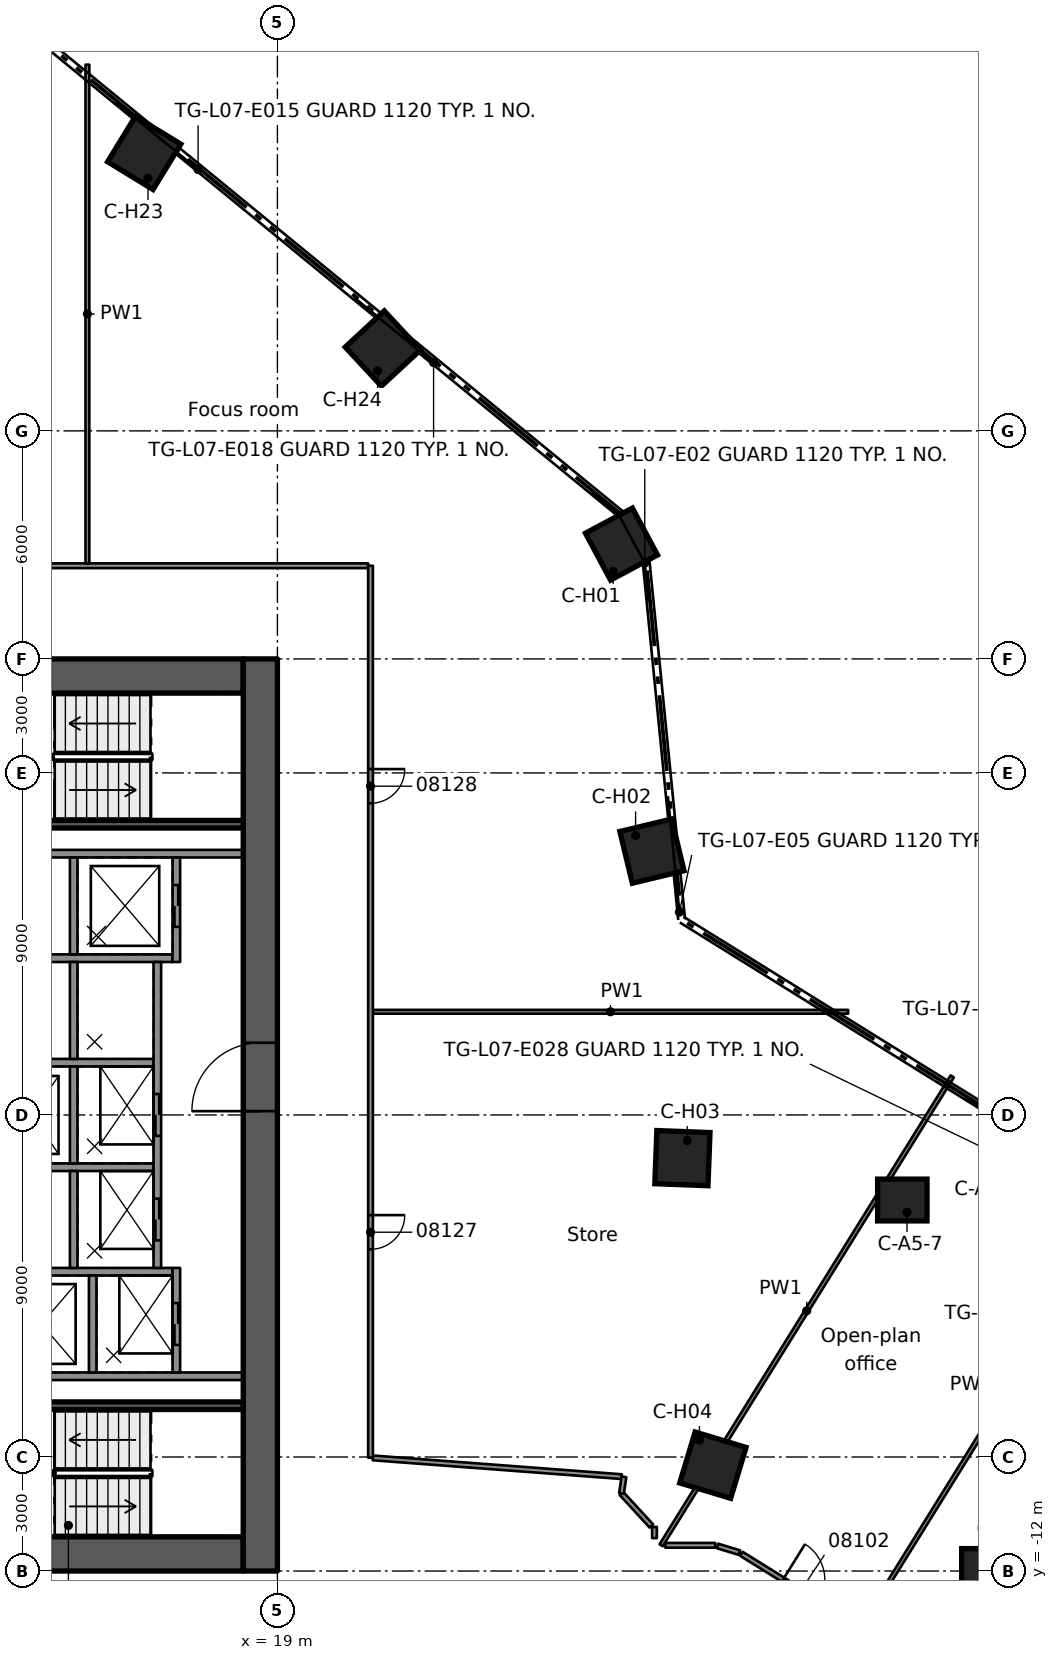
"""IFC4 building model, lengths in metres.
Left out: names, types, materials, properties, quantities, classifications, styles, units other than length and angle.
Written with IfcOpenShell. Run it as: python <this file> out.ifc"""

import sys

from ifc_helpers import new_model, si_unit, direction, frame, frame_2d, origin, origin_2d, place, context, subcontext, project, spatial, rectangle, extrude, element, fill, save


model = new_model("IFC4")
c1 = context("Model", 3, precision=1e-05, world=origin(), true_north=direction((0.0, 1.0)))
c2 = subcontext(c1, "Body", "Model", "MODEL_VIEW")
j1 = project(units=[si_unit("LENGTHUNIT", "METRE"), si_unit("PLANEANGLEUNIT", "RADIAN")], contexts=[c1])
p1 = place(None, origin())
s1 = spatial("IfcSite", under=j1, at=p1, CompositionType="ELEMENT")
p2 = place(p1, origin())
s2 = spatial("IfcBuilding", under=s1, at=p2, CompositionType="ELEMENT")
p3 = place(p2, frame((0.0, 0.0, 37.3)))
s3 = spatial("IfcBuildingStorey", under=s2, at=p3, CompositionType="ELEMENT", Elevation=37.3)
p4 = place(p3, frame((8.9, 11.55, 0.0), z_axis=(0.0, 0.0, 1.0), x_axis=(1.0, 0.0, 0.0)))
e1 = element("IfcWall", 1, at=p4, inside=s3, PredefinedType="SHEAR", context=c2, shape_type="SweptSolid", body=[
    extrude(rectangle(XDim=9.2, YDim=0.9, at=frame_2d((4.6, 0.0))), origin(), (0.0, 0.0, 1.0), 3.5),
])
p5 = place(p4, frame((3.0, 0.0, 0.0)))
e2 = element("IfcOpeningElement", 2, at=p5, cuts=e1, PredefinedType="OPENING", context=c2, shape_type="SweptSolid", body=[
    extrude(rectangle(XDim=1.1, YDim=2.1, at=frame_2d((0.55, 1.05))), frame((0.0, 0.46, 0.0), z_axis=(0.0, -1.0, 0.0), x_axis=(1.0, 0.0, 0.0)), (0.0, 0.0, 1.0), 0.92),
])
p6 = place(p3, frame((8.9, -11.55, 0.0), z_axis=(0.0, 0.0, 1.0), x_axis=(1.0, 0.0, 0.0)))
e3 = element("IfcWall", 3, at=p6, inside=s3, PredefinedType="SHEAR", context=c2, shape_type="SweptSolid", body=[
    extrude(rectangle(XDim=9.2, YDim=0.9, at=frame_2d((4.6, 0.0))), origin(), (0.0, 0.0, 1.0), 3.5),
])
p7 = place(p6, frame((3.0, 0.0, 0.0)))
e4 = element("IfcOpeningElement", 4, at=p7, cuts=e3, PredefinedType="OPENING", context=c2, shape_type="SweptSolid", body=[
    extrude(rectangle(XDim=1.1, YDim=2.1, at=frame_2d((0.55, 1.05))), frame((0.0, 0.46, 0.0), z_axis=(0.0, -1.0, 0.0), x_axis=(1.0, 0.0, 0.0)), (0.0, 0.0, 1.0), 0.92),
])
p8 = place(p3, frame((18.55, -12.0, 0.0), z_axis=(0.0, 0.0, 1.0), x_axis=(0.0, 1.0, 0.0)))
e5 = element("IfcWall", 5, at=p8, inside=s3, PredefinedType="SHEAR", context=c2, shape_type="SweptSolid", body=[
    extrude(rectangle(XDim=24.0, YDim=0.9, at=frame_2d((12.0, 0.0))), origin(), (0.0, 0.0, 1.0), 3.5),
])
p9 = place(p8, frame((12.1, 0.0, 0.0)))
e6 = element("IfcOpeningElement", 6, at=p9, cuts=e5, PredefinedType="OPENING", context=c2, shape_type="SweptSolid", body=[
    extrude(rectangle(XDim=1.8, YDim=2.1, at=frame_2d((0.9, 1.05))), frame((0.0, 0.46, 0.0), z_axis=(0.0, -1.0, 0.0), x_axis=(1.0, 0.0, 0.0)), (0.0, 0.0, 1.0), 0.92),
])
for number, where, z_axis, x_axis in (
    (7, (37.655, -11.96, 0.0), (0.0, 0.0, 1.0), (1.0, 0.0, 0.0)),
    (8, (35.444, -2.238, 0.0), (0.0, 0.0, 1.0), (1.0, 0.0, 0.0)),
):
    element("IfcColumn", number, at=place(p3, frame(where, z_axis=z_axis, x_axis=x_axis)), inside=s3, PredefinedType="COLUMN", context=c2, shape_type="SweptSolid", body=[
        extrude(rectangle(XDim=1.3, YDim=1.1, at=origin_2d()), origin(), (0.0, 0.0, 1.0), 3.5),
    ])
for number, where, z_axis, x_axis in (
    (9, (28.054, 15.021, 0.0), (0.0, 0.0, 1.0), (0.882, 0.472, 0.0)),
    (10, (28.856, 6.942, 0.0), (0.0, 0.0, 1.0), (0.972, 0.234, 0.0)),
    (11, (29.657, -1.136, 0.0), (0.0, 0.0, 1.0), (0.999, -0.038, 0.0)),
    (12, (30.459, -9.215, 0.0), (0.0, 0.0, 1.0), (0.957, -0.29, 0.0)),
    (13, (15.495, 25.313, 0.0), (0.0, 0.0, 1.0), (0.522, 0.853, 0.0)),
    (14, (21.774, 20.167, 0.0), (0.0, 0.0, 1.0), (0.734, 0.68, 0.0)),
):
    element("IfcColumn", number, at=place(p3, frame(where, z_axis=z_axis, x_axis=x_axis)), inside=s3, PredefinedType="COLUMN", context=c2, shape_type="SweptSolid", body=[
        extrude(rectangle(XDim=1.4, YDim=1.4, at=origin_2d()), origin(), (0.0, 0.0, 1.0), 3.5),
    ])
for number, where, z_axis, x_axis in (
    (15, (11.54, -6.875, 0.0), (0.0, 0.0, 1.0), (1.0, 0.0, 0.0)),
    (16, (11.54, 6.875, 0.0), (0.0, 0.0, 1.0), (1.0, 0.0, 0.0)),
):
    element("IfcWall", number, at=place(p3, frame(where, z_axis=z_axis, x_axis=x_axis)), inside=s3, PredefinedType="SOLIDWALL", context=c2, shape_type="SweptSolid", body=[
        extrude(rectangle(XDim=6.56, YDim=0.2, at=frame_2d((3.28, 0.0))), origin(), (0.0, 0.0, 1.0), 3.08),
    ])
p10 = place(p3, frame((11.54, 4.125, 0.0), z_axis=(0.0, 0.0, 1.0), x_axis=(1.0, 0.0, 0.0)))
e17 = element("IfcWall", 17, at=p10, inside=s3, PredefinedType="SOLIDWALL", context=c2, shape_type="SweptSolid", body=[
    extrude(rectangle(XDim=4.7, YDim=0.2, at=frame_2d((2.35, 0.0))), origin(), (0.0, 0.0, 1.0), 3.08),
])
for number, where, z_axis, x_axis in (
    (18, (11.54, 1.375, 0.0), (0.0, 0.0, 1.0), (1.0, 0.0, 0.0)),
    (19, (11.54, -1.375, 0.0), (0.0, 0.0, 1.0), (1.0, 0.0, 0.0)),
):
    element("IfcWall", number, at=place(p3, frame(where, z_axis=z_axis, x_axis=x_axis)), inside=s3, PredefinedType="SOLIDWALL", context=c2, shape_type="SweptSolid", body=[
        extrude(rectangle(XDim=4.2, YDim=0.2, at=frame_2d((2.1, 0.0))), origin(), (0.0, 0.0, 1.0), 3.08),
    ])
p11 = place(p3, frame((11.54, -4.125, 0.0), z_axis=(0.0, 0.0, 1.0), x_axis=(1.0, 0.0, 0.0)))
e20 = element("IfcWall", 20, at=p11, inside=s3, PredefinedType="SOLIDWALL", context=c2, shape_type="SweptSolid", body=[
    extrude(rectangle(XDim=4.7, YDim=0.2, at=frame_2d((2.35, 0.0))), origin(), (0.0, 0.0, 1.0), 3.08),
])
for number, where, z_axis, x_axis in (
    (21, (13.64, 6.775, 0.0), (0.0, 0.0, 1.0), (0.0, -1.0, 0.0)),
    (22, (13.64, 4.025, 0.0), (0.0, 0.0, 1.0), (0.0, -1.0, 0.0)),
    (23, (13.64, 1.275, 0.0), (0.0, 0.0, 1.0), (0.0, -1.0, 0.0)),
    (24, (13.64, -1.475, 0.0), (0.0, 0.0, 1.0), (0.0, -1.0, 0.0)),
    (25, (14.14, -4.225, 0.0), (0.0, 0.0, 1.0), (0.0, -1.0, 0.0)),
):
    element("IfcWall", number, at=place(p3, frame(where, z_axis=z_axis, x_axis=x_axis)), inside=s3, PredefinedType="SOLIDWALL", context=c2, shape_type="SweptSolid", body=[
        extrude(rectangle(XDim=2.55, YDim=0.2, at=frame_2d((1.275, 0.0))), origin(), (0.0, 0.0, 1.0), 3.08),
    ])
p12 = place(p3, frame((16.34, 6.775, 0.0), z_axis=(0.0, 0.0, 1.0), x_axis=(0.0, -1.0, 0.0)))
e26 = element("IfcWall", 26, at=p12, inside=s3, PredefinedType="SOLIDWALL", context=c2, shape_type="SweptSolid", body=[
    extrude(rectangle(XDim=2.75, YDim=0.2, at=frame_2d((1.375, 0.0))), origin(), (0.0, 0.0, 1.0), 3.08),
])
p13 = place(p12, frame((0.725, 0.0, 0.0)))
e27 = element("IfcOpeningElement", 27, at=p13, cuts=e26, PredefinedType="OPENING", context=c2, shape_type="SweptSolid", body=[
    extrude(rectangle(XDim=1.1, YDim=2.1, at=frame_2d((0.55, 1.05))), frame((0.0, 0.11, 0.0), z_axis=(0.0, -1.0, 0.0), x_axis=(1.0, 0.0, 0.0)), (0.0, 0.0, 1.0), 0.22),
])
p14 = place(p3, frame((15.84, 4.025, 0.0), z_axis=(0.0, 0.0, 1.0), x_axis=(0.0, -1.0, 0.0)))
e28 = element("IfcWall", 28, at=p14, inside=s3, PredefinedType="SOLIDWALL", context=c2, shape_type="SweptSolid", body=[
    extrude(rectangle(XDim=8.05, YDim=0.2, at=frame_2d((4.025, 0.0))), origin(), (0.0, 0.0, 1.0), 3.08),
])
p15 = place(p14, frame((3.475, 0.0, 0.0)))
e29 = element("IfcOpeningElement", 29, at=p15, cuts=e28, PredefinedType="OPENING", context=c2, shape_type="SweptSolid", body=[
    extrude(rectangle(XDim=1.1, YDim=2.1, at=frame_2d((0.55, 1.05))), frame((0.0, 0.11, 0.0), z_axis=(0.0, -1.0, 0.0), x_axis=(1.0, 0.0, 0.0)), (0.0, 0.0, 1.0), 0.22),
])
p16 = place(p14, frame((6.225, 0.0, 0.0)))
e30 = element("IfcOpeningElement", 30, at=p16, cuts=e28, PredefinedType="OPENING", context=c2, shape_type="SweptSolid", body=[
    extrude(rectangle(XDim=1.1, YDim=2.1, at=frame_2d((0.55, 1.05))), frame((0.0, 0.11, 0.0), z_axis=(0.0, -1.0, 0.0), x_axis=(1.0, 0.0, 0.0)), (0.0, 0.0, 1.0), 0.22),
])
p17 = place(p3, frame((16.34, -4.025, 0.0), z_axis=(0.0, 0.0, 1.0), x_axis=(0.0, -1.0, 0.0)))
e31 = element("IfcWall", 31, at=p17, inside=s3, PredefinedType="SOLIDWALL", context=c2, shape_type="SweptSolid", body=[
    extrude(rectangle(XDim=2.75, YDim=0.2, at=frame_2d((1.375, 0.0))), origin(), (0.0, 0.0, 1.0), 3.08),
])
p18 = place(p17, frame((0.925, 0.0, 0.0)))
e32 = element("IfcOpeningElement", 32, at=p18, cuts=e31, PredefinedType="OPENING", context=c2, shape_type="SweptSolid", body=[
    extrude(rectangle(XDim=1.1, YDim=2.1, at=frame_2d((0.55, 1.05))), frame((0.0, 0.11, 0.0), z_axis=(0.0, -1.0, 0.0), x_axis=(1.0, 0.0, 0.0)), (0.0, 0.0, 1.0), 0.22),
])
for number, where, z_axis, x_axis in (
    (33, (11.54, -7.65, 0.0), (0.0, 0.0, 1.0), (1.0, 0.0, 0.0)),
    (34, (11.54, 7.65, 0.0), (0.0, 0.0, 1.0), (1.0, 0.0, 0.0)),
):
    element("IfcWall", number, at=place(p3, frame(where, z_axis=z_axis, x_axis=x_axis)), inside=s3, PredefinedType="SOLIDWALL", context=c2, shape_type="SweptSolid", body=[
        extrude(rectangle(XDim=6.56, YDim=0.2, at=frame_2d((3.28, 0.0))), origin(), (0.0, 0.0, 1.0), 3.08),
    ])
p19 = place(p3, frame((31.21, -11.548, 0.0), z_axis=(0.0, 0.0, 1.0), x_axis=(0.849604026752, -0.527421081989, 0.0)))
e35 = element("IfcWall", 35, at=p19, inside=s3, PredefinedType="PARTITIONING", context=c2, shape_type="SweptSolid", body=[
    extrude(rectangle(XDim=17.536, YDim=0.125, at=frame_2d((8.768, 0.0))), origin(), (0.0, 0.0, 1.0), 3.06),
])
p20 = place(p19, frame((1.288, 0.0, 0.0)))
e36 = element("IfcOpeningElement", 36, at=p20, cuts=e35, PredefinedType="OPENING", context=c2, shape_type="SweptSolid", body=[
    extrude(rectangle(XDim=1.1, YDim=2.1, at=frame_2d((0.55, 1.05))), frame((0.0, 0.073, 0.0), z_axis=(0.0, -1.0, 0.0), x_axis=(1.0, 0.0, 0.0)), (0.0, 0.0, 1.0), 0.145),
])
p21 = place(p19, frame((4.043, 0.0, 0.0)))
e37 = element("IfcOpeningElement", 37, at=p21, cuts=e35, PredefinedType="OPENING", context=c2, shape_type="SweptSolid", body=[
    extrude(rectangle(XDim=1.1, YDim=2.1, at=frame_2d((0.55, 1.05))), frame((0.0, 0.073, 0.0), z_axis=(0.0, -1.0, 0.0), x_axis=(1.0, 0.0, 0.0)), (0.0, 0.0, 1.0), 0.145),
])
p22 = place(p19, frame((12.844, 0.0, 0.0)))
e38 = element("IfcOpeningElement", 38, at=p22, cuts=e35, PredefinedType="OPENING", context=c2, shape_type="SweptSolid", body=[
    extrude(rectangle(XDim=1.1, YDim=2.1, at=frame_2d((0.55, 1.05))), frame((0.0, 0.073, 0.0), z_axis=(0.0, -1.0, 0.0), x_axis=(1.0, 0.0, 0.0)), (0.0, 0.0, 1.0), 0.145),
])
p23 = place(p3, frame((28.054, -9.96, 0.0), z_axis=(0.0, 0.0, 1.0), x_axis=(0.677302255473, -0.735704869313, 0.0)))
e39 = element("IfcWall", 39, at=p23, inside=s3, PredefinedType="PARTITIONING", context=c2, shape_type="SweptSolid", body=[
    extrude(rectangle(XDim=1.162, YDim=0.125, at=frame_2d((0.581, 0.0))), origin(), (0.0, 0.0, 1.0), 3.06),
])
p24 = place(p3, frame((30.582, -11.341, 0.0), z_axis=(0.0, 0.0, 1.0), x_axis=(0.957208808848, -0.289398162165, 0.0)))
e40 = element("IfcWall", 40, at=p24, inside=s3, PredefinedType="PARTITIONING", context=c2, shape_type="SweptSolid", body=[
    extrude(rectangle(XDim=0.601, YDim=0.125, at=frame_2d((0.3, 0.0))), origin(), (0.0, 0.0, 1.0), 3.06),
])
p25 = place(p3, frame((21.512, -9.023, 0.0), z_axis=(0.0, 0.0, 1.0), x_axis=(0.997163067234, -0.075271623768, 0.0)))
e41 = element("IfcWall", 41, at=p25, inside=s3, PredefinedType="PARTITIONING", context=c2, shape_type="SweptSolid", body=[
    extrude(rectangle(XDim=6.565, YDim=0.125, at=frame_2d((3.282, 0.0))), origin(), (0.0, 0.0, 1.0), 3.06),
])
p26 = place(p3, frame((29.209, -11.323, 0.0), z_axis=(0.0, 0.0, 1.0), x_axis=(1.0, 0.0, 0.0)))
e42 = element("IfcWall", 42, at=p26, inside=s3, PredefinedType="PARTITIONING", context=c2, shape_type="SweptSolid", body=[
    extrude(rectangle(XDim=1.313, YDim=0.125, at=frame_2d((0.656, 0.0))), origin(), (0.0, 0.0, 1.0), 3.06),
])
p27 = place(p3, frame((21.512, 2.715, 0.0), z_axis=(0.0, 0.0, 1.0), x_axis=(1.0, 0.0, 0.0)))
e43 = element("IfcWall", 43, at=p27, inside=s3, PredefinedType="PARTITIONING", context=c2, shape_type="SweptSolid", body=[
    extrude(rectangle(XDim=12.506, YDim=0.1, at=frame_2d((6.253, 0.0))), origin(), (0.0, 0.0, 1.0), 3.06),
])
p28 = place(p3, frame((10.391, 14.451, 0.0), z_axis=(0.0, 0.0, 1.0), x_axis=(1.0, 0.0, 0.0)))
e44 = element("IfcWall", 44, at=p28, inside=s3, PredefinedType="PARTITIONING", context=c2, shape_type="SweptSolid", body=[
    extrude(rectangle(XDim=10.996, YDim=0.125, at=frame_2d((5.498, 0.0))), origin(), (0.0, 0.0, 1.0), 3.06),
])
p29 = place(p3, frame((34.381, -13.443, 0.0), z_axis=(0.0, 0.0, 1.0), x_axis=(0.527467467503, 0.849575229586, 0.0)))
e45 = element("IfcWall", 45, at=p29, inside=s3, PredefinedType="PARTITIONING", context=c2, shape_type="SweptSolid", body=[
    extrude(rectangle(XDim=13.536, YDim=0.1, at=frame_2d((6.768, 0.0))), origin(), (0.0, 0.0, 1.0), 3.06),
])
p30 = place(p3, frame((29.098, -11.322, 0.0), z_axis=(0.0, 0.0, 1.0), x_axis=(0.527451584377, 0.849585090582, 0.0)))
e46 = element("IfcWall", 46, at=p30, inside=s3, PredefinedType="PARTITIONING", context=c2, shape_type="SweptSolid", body=[
    extrude(rectangle(XDim=14.521, YDim=0.1, at=frame_2d((7.26, 0.0))), origin(), (0.0, 0.0, 1.0), 3.06),
])
p31 = place(p3, frame((28.054, -9.96, 0.0), z_axis=(0.0, 0.0, 1.0), x_axis=(0.146668558618, 0.989185692331, 0.0)))
e47 = element("IfcWall", 47, at=p31, inside=s3, PredefinedType="PARTITIONING", context=c2, shape_type="SweptSolid", body=[
    extrude(rectangle(XDim=0.443, YDim=0.125, at=frame_2d((0.221, 0.0))), origin(), (0.0, 0.0, 1.0), 3.06),
])
p32 = place(p3, frame((28.922, -11.134, 0.0), z_axis=(0.0, 0.0, 1.0), x_axis=(0.0, 1.0, 0.0)))
e48 = element("IfcWall", 48, at=p32, inside=s3, PredefinedType="PARTITIONING", context=c2, shape_type="SweptSolid", body=[
    extrude(rectangle(XDim=0.295, YDim=0.125, at=frame_2d((0.147, 0.0))), origin(), (0.0, 0.0, 1.0), 3.06),
])
p33 = place(p3, frame((21.45, 14.451, 0.0), z_axis=(0.0, 0.0, 1.0), x_axis=(0.0, -1.0, 0.0)))
e49 = element("IfcWall", 49, at=p33, inside=s3, PredefinedType="PARTITIONING", context=c2, shape_type="SweptSolid", body=[
    extrude(rectangle(XDim=23.469, YDim=0.125, at=frame_2d((11.734, 0.0))), origin(), (0.0, 0.0, 1.0), 3.06),
])
p34 = place(p33, frame((17.086, 0.0, 0.0)))
e50 = element("IfcOpeningElement", 50, at=p34, cuts=e49, PredefinedType="OPENING", context=c2, shape_type="SweptSolid", body=[
    extrude(rectangle(XDim=0.9, YDim=2.1, at=frame_2d((0.45, 1.05))), frame((0.0, 0.073, 0.0), z_axis=(0.0, -1.0, 0.0), x_axis=(1.0, 0.0, 0.0)), (0.0, 0.0, 1.0), 0.145),
])
p35 = place(p33, frame((5.35, 0.0, 0.0)))
e51 = element("IfcOpeningElement", 51, at=p35, cuts=e49, PredefinedType="OPENING", context=c2, shape_type="SweptSolid", body=[
    extrude(rectangle(XDim=0.9, YDim=2.1, at=frame_2d((0.45, 1.05))), frame((0.0, 0.073, 0.0), z_axis=(0.0, -1.0, 0.0), x_axis=(1.0, 0.0, 0.0)), (0.0, 0.0, 1.0), 0.145),
])
p36 = place(p3, frame((14.0, 14.514, 0.0), z_axis=(0.0, 0.0, 1.0), x_axis=(0.0, 1.0, 0.0)))
e52 = element("IfcWall", 52, at=p36, inside=s3, PredefinedType="PARTITIONING", context=c2, shape_type="SweptSolid", body=[
    extrude(rectangle(XDim=13.122, YDim=0.1, at=frame_2d((6.561, 0.0))), origin(), (0.0, 0.0, 1.0), 3.06),
])
p37 = place(p13, origin())
e53 = element("IfcDoor", 53, at=p37, inside=s3, OperationType="DOUBLE_DOOR_SLIDING", PredefinedType="DOOR", context=c2, shape_type="SweptSolid", body=[
    extrude(rectangle(XDim=1.1, YDim=2.1, at=frame_2d((0.55, 1.05))), frame((0.0, 0.025, 0.0), z_axis=(0.0, -1.0, 0.0), x_axis=(1.0, 0.0, 0.0)), (0.0, 0.0, 1.0), 0.05),
])
fill(e27, e53)
p38 = place(p15, origin())
e54 = element("IfcDoor", 54, at=p38, inside=s3, OperationType="DOUBLE_DOOR_SLIDING", PredefinedType="DOOR", context=c2, shape_type="SweptSolid", body=[
    extrude(rectangle(XDim=1.1, YDim=2.1, at=frame_2d((0.55, 1.05))), frame((0.0, 0.025, 0.0), z_axis=(0.0, -1.0, 0.0), x_axis=(1.0, 0.0, 0.0)), (0.0, 0.0, 1.0), 0.05),
])
fill(e29, e54)
p39 = place(p16, origin())
e55 = element("IfcDoor", 55, at=p39, inside=s3, OperationType="DOUBLE_DOOR_SLIDING", PredefinedType="DOOR", context=c2, shape_type="SweptSolid", body=[
    extrude(rectangle(XDim=1.1, YDim=2.1, at=frame_2d((0.55, 1.05))), frame((0.0, 0.025, 0.0), z_axis=(0.0, -1.0, 0.0), x_axis=(1.0, 0.0, 0.0)), (0.0, 0.0, 1.0), 0.05),
])
fill(e30, e55)
p40 = place(p18, origin())
e56 = element("IfcDoor", 56, at=p40, inside=s3, OperationType="DOUBLE_DOOR_SLIDING", PredefinedType="DOOR", context=c2, shape_type="SweptSolid", body=[
    extrude(rectangle(XDim=1.1, YDim=2.1, at=frame_2d((0.55, 1.05))), frame((0.0, 0.025, 0.0), z_axis=(0.0, -1.0, 0.0), x_axis=(1.0, 0.0, 0.0)), (0.0, 0.0, 1.0), 0.05),
])
fill(e32, e56)
p41 = place(p9, origin())
e57 = element("IfcDoor", 57, at=p41, inside=s3, OperationType="SINGLE_SWING_RIGHT", PredefinedType="DOOR", context=c2, shape_type="SweptSolid", body=[
    extrude(rectangle(XDim=1.8, YDim=2.1, at=frame_2d((0.9, 1.05))), frame((0.0, 0.025, 0.0), z_axis=(0.0, -1.0, 0.0), x_axis=(1.0, 0.0, 0.0)), (0.0, 0.0, 1.0), 0.05),
])
fill(e6, e57)
p42 = place(p20, origin())
e58 = element("IfcDoor", 58, at=p42, inside=s3, OperationType="SINGLE_SWING_LEFT", PredefinedType="DOOR", context=c2, shape_type="SweptSolid", body=[
    extrude(rectangle(XDim=1.1, YDim=2.1, at=frame_2d((0.55, 1.05))), frame((0.0, 0.025, 0.0), z_axis=(0.0, -1.0, 0.0), x_axis=(1.0, 0.0, 0.0)), (0.0, 0.0, 1.0), 0.05),
])
fill(e36, e58)
p43 = place(p34, origin())
e59 = element("IfcDoor", 59, at=p43, inside=s3, OperationType="SINGLE_SWING_RIGHT", PredefinedType="DOOR", context=c2, shape_type="SweptSolid", body=[
    extrude(rectangle(XDim=0.9, YDim=2.1, at=frame_2d((0.45, 1.05))), frame((0.0, 0.025, 0.0), z_axis=(0.0, -1.0, 0.0), x_axis=(1.0, 0.0, 0.0)), (0.0, 0.0, 1.0), 0.05),
])
fill(e50, e59)
p44 = place(p35, origin())
e60 = element("IfcDoor", 60, at=p44, inside=s3, OperationType="SINGLE_SWING_LEFT", PredefinedType="DOOR", context=c2, shape_type="SweptSolid", body=[
    extrude(rectangle(XDim=0.9, YDim=2.1, at=frame_2d((0.45, 1.05))), frame((0.0, 0.025, 0.0), z_axis=(0.0, -1.0, 0.0), x_axis=(1.0, 0.0, 0.0)), (0.0, 0.0, 1.0), 0.05),
])
fill(e51, e60)
save(model, sys.argv[1])
